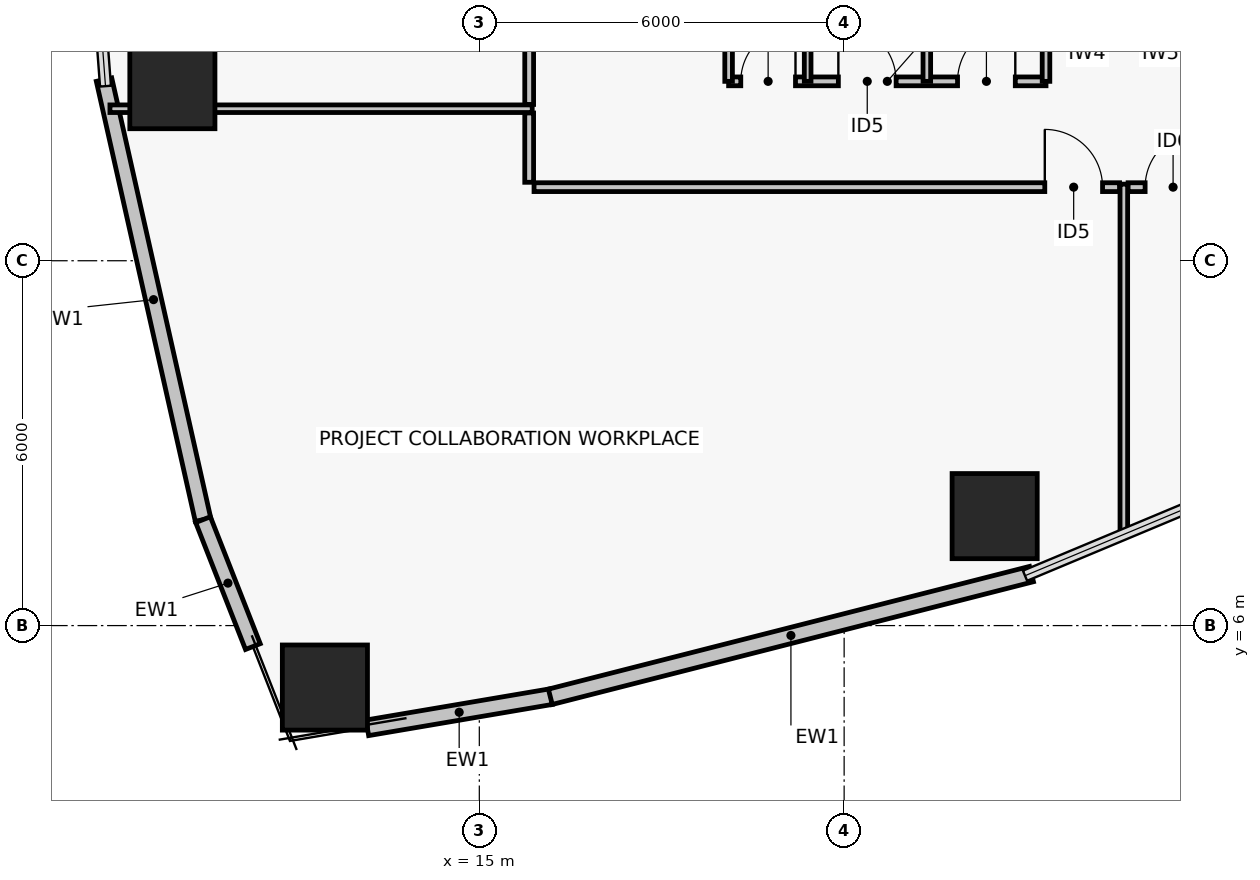
"""IFC4 building model, lengths in metres.
Left out: names, types, materials, properties, quantities, classifications, styles, units other than length and angle.
Written with IfcOpenShell. Run it as: python <this file> out.ifc"""

import sys

from ifc_helpers import new_model, si_unit, direction, frame, frame_2d, origin, origin_2d, place, context, subcontext, project, spatial, rectangle, hollow_rectangle, extrude, element, fill, save


model = new_model("IFC4")
c1 = context("Model", 3, precision=1e-05, world=origin(), true_north=direction((0.0, 1.0)))
c2 = subcontext(c1, "Body", "Model", "MODEL_VIEW")
j1 = project(units=[si_unit("LENGTHUNIT", "METRE"), si_unit("PLANEANGLEUNIT", "RADIAN")], contexts=[c1])
p1 = place(None, origin())
s1 = spatial("IfcSite", under=j1, at=p1, CompositionType="ELEMENT")
p2 = place(p1, origin())
s2 = spatial("IfcBuilding", under=s1, at=p2, CompositionType="ELEMENT")
p3 = place(p2, frame((0.0, 0.0, 22.8)))
s3 = spatial("IfcBuildingStorey", under=s2, at=p3, CompositionType="ELEMENT", Elevation=22.8)
for number, where, z_axis, x_axis in (
    (1, (9.952, 14.871, 0.0), (0.0, 0.0, 1.0), (1.0, 0.0, 0.0)),
    (2, (12.46, 4.981, 0.0), (0.0, 0.0, 1.0), (1.0, 0.0, 0.0)),
    (3, (23.476, 7.8, 0.0), (0.0, 0.0, 1.0), (1.0, 0.0, 0.0)),
):
    element("IfcColumn", number, at=place(p3, frame(where, z_axis=z_axis, x_axis=x_axis)), inside=s3, PredefinedType="COLUMN", context=c2, shape_type="SweptSolid", body=[
        extrude(hollow_rectangle(XDim=1.4, YDim=1.4, WallThickness=0.055, at=origin_2d()), origin(), (0.0, 0.0, 1.0), 4.8),
    ])
p4 = place(p3, frame((10.456, 7.742, 0.0), z_axis=(0.0, 0.0, 1.0), x_axis=(-0.219512195122, 0.975609756098, 0.0)))
e4 = element("IfcWall", 4, at=p4, inside=s3, PredefinedType="PARTITIONING", context=c2, shape_type="SweptSolid", body=[
    extrude(rectangle(XDim=7.417, YDim=0.26, at=frame_2d((3.708, 0.0))), origin(), (0.0, 0.0, 1.0), 4.55),
])
p5 = place(p3, frame((11.276, 5.655, 0.0), z_axis=(0.0, 0.0, 1.0), x_axis=(-0.365527759733, 0.930800438797, 0.0)))
e5 = element("IfcWall", 5, at=p5, inside=s3, PredefinedType="PARTITIONING", context=c2, shape_type="SweptSolid", body=[
    extrude(rectangle(XDim=2.243, YDim=0.26, at=frame_2d((1.122, 0.0))), origin(), (0.0, 0.0, 1.0), 4.55),
])
p6 = place(p3, frame((16.179, 4.831, 0.0), z_axis=(0.0, 0.0, 1.0), x_axis=(-0.985905166387, -0.167305119144, 0.0)))
e6 = element("IfcWall", 6, at=p6, inside=s3, PredefinedType="PARTITIONING", context=c2, shape_type="SweptSolid", body=[
    extrude(rectangle(XDim=3.064, YDim=0.26, at=frame_2d((1.532, 0.0))), origin(), (0.0, 0.0, 1.0), 4.55),
])
p7 = place(p3, frame((24.081, 6.847, 0.0), z_axis=(0.0, 0.0, 1.0), x_axis=(-0.968981557045, -0.247133045354, 0.0)))
e7 = element("IfcWall", 7, at=p7, inside=s3, PredefinedType="PARTITIONING", context=c2, shape_type="SweptSolid", body=[
    extrude(rectangle(XDim=8.167, YDim=0.26, at=frame_2d((4.083, 0.0))), origin(), (0.0, 0.0, 1.0), 4.55),
])
p8 = place(p3, frame((19.1, 14.95, 0.0), z_axis=(0.0, 0.0, 1.0), x_axis=(1.0, 0.0, 0.0)))
e8 = element("IfcWall", 8, at=p8, inside=s3, PredefinedType="PARTITIONING", context=c2, shape_type="SweptSolid", body=[
    extrude(rectangle(XDim=5.22, YDim=0.145, at=frame_2d((2.61, 0.0))), origin(), (0.0, 0.0, 1.0), 3.13),
])
p9 = place(p8, frame((0.2, 0.0, 0.0)))
e9 = element("IfcOpeningElement", 9, at=p9, cuts=e8, PredefinedType="OPENING", context=c2, shape_type="SweptSolid", body=[
    extrude(rectangle(XDim=0.9, YDim=2.02, at=frame_2d((0.45, 1.01))), frame((0.0, 0.083, 0.0), z_axis=(0.0, -1.0, 0.0), x_axis=(1.0, 0.0, 0.0)), (0.0, 0.0, 1.0), 0.165),
])
p10 = place(p8, frame((1.805, 0.0, 0.0)))
e10 = element("IfcOpeningElement", 10, at=p10, cuts=e8, PredefinedType="OPENING", context=c2, shape_type="SweptSolid", body=[
    extrude(rectangle(XDim=0.95, YDim=2.06, at=frame_2d((0.475, 1.03))), frame((0.0, 0.083, 0.0), z_axis=(0.0, -1.0, 0.0), x_axis=(1.0, 0.0, 0.0)), (0.0, 0.0, 1.0), 0.165),
])
p11 = place(p8, frame((3.765, 0.0, 0.0)))
e11 = element("IfcOpeningElement", 11, at=p11, cuts=e8, PredefinedType="OPENING", context=c2, shape_type="SweptSolid", body=[
    extrude(rectangle(XDim=0.95, YDim=2.06, at=frame_2d((0.475, 1.03))), frame((0.0, 0.083, 0.0), z_axis=(0.0, -1.0, 0.0), x_axis=(1.0, 0.0, 0.0)), (0.0, 0.0, 1.0), 0.165),
])
p12 = place(p3, frame((19.1, 14.95, 0.0), z_axis=(0.0, 0.0, 1.0), x_axis=(0.0, 1.0, 0.0)))
e12 = element("IfcWall", 12, at=p12, inside=s3, PredefinedType="PARTITIONING", context=c2, shape_type="SweptSolid", body=[
    extrude(rectangle(XDim=2.25, YDim=0.125, at=frame_2d((1.125, 0.0))), origin(), (0.0, 0.0, 1.0), 3.68),
])
p13 = place(p3, frame((20.4, 14.95, 0.0), z_axis=(0.0, 0.0, 1.0), x_axis=(0.0, 1.0, 0.0)))
e13 = element("IfcWall", 13, at=p13, inside=s3, PredefinedType="PARTITIONING", context=c2, shape_type="SweptSolid", body=[
    extrude(rectangle(XDim=2.25, YDim=0.11, at=frame_2d((1.125, 0.0))), origin(), (0.0, 0.0, 1.0), 3.68),
])
p14 = place(p3, frame((22.36, 14.95, 0.0), z_axis=(0.0, 0.0, 1.0), x_axis=(0.0, 1.0, 0.0)))
e14 = element("IfcWall", 14, at=p14, inside=s3, PredefinedType="PARTITIONING", context=c2, shape_type="SweptSolid", body=[
    extrude(rectangle(XDim=2.25, YDim=0.125, at=frame_2d((1.125, 0.0))), origin(), (0.0, 0.0, 1.0), 3.13),
])
p15 = place(p3, frame((24.32, 14.95, 0.0), z_axis=(0.0, 0.0, 1.0), x_axis=(0.0, 1.0, 0.0)))
e15 = element("IfcWall", 15, at=p15, inside=s3, PredefinedType="PARTITIONING", context=c2, shape_type="SweptSolid", body=[
    extrude(rectangle(XDim=2.25, YDim=0.125, at=frame_2d((1.125, 0.0))), origin(), (0.0, 0.0, 1.0), 3.68),
])
p16 = place(p3, frame((15.82, 21.93, 0.0), z_axis=(0.0, 0.0, 1.0), x_axis=(0.0, -1.0, 0.0)))
e16 = element("IfcWall", 16, at=p16, inside=s3, PredefinedType="PARTITIONING", context=c2, shape_type="SweptSolid", body=[
    extrude(rectangle(XDim=7.36, YDim=0.145, at=frame_2d((3.68, 0.0))), origin(), (0.0, 0.0, 1.0), 3.13),
])
p17 = place(p16, frame((0.28, 0.0, 0.0)))
e17 = element("IfcOpeningElement", 17, at=p17, cuts=e16, PredefinedType="OPENING", context=c2, shape_type="SweptSolid", body=[
    extrude(rectangle(XDim=0.95, YDim=2.06, at=frame_2d((0.475, 1.03))), frame((0.0, 0.083, 0.0), z_axis=(0.0, -1.0, 0.0), x_axis=(1.0, 0.0, 0.0)), (0.0, 0.0, 1.0), 0.165),
])
p18 = place(p3, frame((15.82, 14.43, 0.0), z_axis=(0.0, 0.0, 1.0), x_axis=(0.0, -1.0, 0.0)))
e18 = element("IfcWall", 18, at=p18, inside=s3, PredefinedType="PARTITIONING", context=c2, shape_type="SweptSolid", body=[
    extrude(rectangle(XDim=1.14, YDim=0.145, at=frame_2d((0.57, 0.0))), origin(), (0.0, 0.0, 1.0), 4.55),
])
p19 = place(p3, frame((15.9, 13.21, 0.0), z_axis=(0.0, 0.0, 1.0), x_axis=(1.0, 0.0, 0.0)))
e19 = element("IfcWall", 19, at=p19, inside=s3, PredefinedType="PARTITIONING", context=c2, shape_type="SweptSolid", body=[
    extrude(rectangle(XDim=9.63, YDim=0.145, at=frame_2d((4.815, 0.0))), origin(), (0.0, 0.0, 1.0), 3.13),
])
p20 = place(p19, frame((8.4, 0.0, 0.0)))
e20 = element("IfcOpeningElement", 20, at=p20, cuts=e19, PredefinedType="OPENING", context=c2, shape_type="SweptSolid", body=[
    extrude(rectangle(XDim=0.95, YDim=2.06, at=frame_2d((0.475, 1.03))), frame((0.0, 0.083, 0.0), z_axis=(0.0, -1.0, 0.0), x_axis=(1.0, 0.0, 0.0)), (0.0, 0.0, 1.0), 0.165),
])
p21 = place(p3, frame((25.67, 13.21, 0.0), z_axis=(0.0, 0.0, 1.0), x_axis=(1.0, 0.0, 0.0)))
e21 = element("IfcWall", 21, at=p21, inside=s3, PredefinedType="PARTITIONING", context=c2, shape_type="SweptSolid", body=[
    extrude(rectangle(XDim=7.13, YDim=0.145, at=frame_2d((3.565, 0.0))), origin(), (0.0, 0.0, 1.0), 4.55),
])
p22 = place(p21, frame((0.28, 0.0, 0.0)))
e22 = element("IfcOpeningElement", 22, at=p22, cuts=e21, PredefinedType="OPENING", context=c2, shape_type="SweptSolid", body=[
    extrude(rectangle(XDim=0.92, YDim=2.05, at=frame_2d((0.46, 1.025))), frame((0.0, 0.083, 0.0), z_axis=(0.0, -1.0, 0.0), x_axis=(1.0, 0.0, 0.0)), (0.0, 0.0, 1.0), 0.165),
])
p23 = place(p3, frame((25.6, 7.489, 0.0), z_axis=(0.0, 0.0, 1.0), x_axis=(0.0, 1.0, 0.0)))
e23 = element("IfcWall", 23, at=p23, inside=s3, PredefinedType="PARTITIONING", context=c2, shape_type="SweptSolid", body=[
    extrude(rectangle(XDim=5.771, YDim=0.125, at=frame_2d((2.885, 0.0))), origin(), (0.0, 0.0, 1.0), 3.93),
])
p24 = place(p3, frame((8.925, 14.5, 0.0), z_axis=(0.0, 0.0, 1.0), x_axis=(1.0, 0.0, 0.0)))
e24 = element("IfcWall", 24, at=p24, inside=s3, PredefinedType="PARTITIONING", context=c2, shape_type="SweptSolid", body=[
    extrude(rectangle(XDim=6.945, YDim=0.125, at=frame_2d((3.472, 0.0))), origin(), (0.0, 0.0, 1.0), 3.13),
])
p25 = place(p9, origin())
e25 = element("IfcDoor", 25, at=p25, inside=s3, OperationType="SINGLE_SWING_RIGHT", PredefinedType="DOOR", context=c2, shape_type="SweptSolid", body=[
    extrude(rectangle(XDim=0.9, YDim=2.02, at=frame_2d((0.45, 1.01))), frame((0.0, 0.025, 0.0), z_axis=(0.0, -1.0, 0.0), x_axis=(1.0, 0.0, 0.0)), (0.0, 0.0, 1.0), 0.05),
])
fill(e9, e25)
p26 = place(p10, origin())
e26 = element("IfcDoor", 26, at=p26, inside=s3, OperationType="SINGLE_SWING_LEFT", PredefinedType="DOOR", context=c2, shape_type="SweptSolid", body=[
    extrude(rectangle(XDim=0.95, YDim=2.06, at=frame_2d((0.475, 1.03))), frame((0.0, 0.025, 0.0), z_axis=(0.0, -1.0, 0.0), x_axis=(1.0, 0.0, 0.0)), (0.0, 0.0, 1.0), 0.05),
])
fill(e10, e26)
p27 = place(p11, origin())
e27 = element("IfcDoor", 27, at=p27, inside=s3, OperationType="SINGLE_SWING_RIGHT", PredefinedType="DOOR", context=c2, shape_type="SweptSolid", body=[
    extrude(rectangle(XDim=0.95, YDim=2.06, at=frame_2d((0.475, 1.03))), frame((0.0, 0.025, 0.0), z_axis=(0.0, -1.0, 0.0), x_axis=(1.0, 0.0, 0.0)), (0.0, 0.0, 1.0), 0.05),
])
fill(e11, e27)
p28 = place(p20, origin())
e28 = element("IfcDoor", 28, at=p28, inside=s3, OperationType="SINGLE_SWING_LEFT", PredefinedType="DOOR", context=c2, shape_type="SweptSolid", body=[
    extrude(rectangle(XDim=0.95, YDim=2.06, at=frame_2d((0.475, 1.03))), frame((0.0, 0.025, 0.0), z_axis=(0.0, -1.0, 0.0), x_axis=(1.0, 0.0, 0.0)), (0.0, 0.0, 1.0), 0.05),
])
fill(e20, e28)
p29 = place(p22, origin())
e29 = element("IfcDoor", 29, at=p29, inside=s3, OperationType="SINGLE_SWING_RIGHT", PredefinedType="DOOR", context=c2, shape_type="SweptSolid", body=[
    extrude(rectangle(XDim=0.92, YDim=2.05, at=frame_2d((0.46, 1.025))), frame((0.0, 0.025, 0.0), z_axis=(0.0, -1.0, 0.0), x_axis=(1.0, 0.0, 0.0)), (0.0, 0.0, 1.0), 0.05),
])
fill(e22, e29)
save(model, sys.argv[1])
